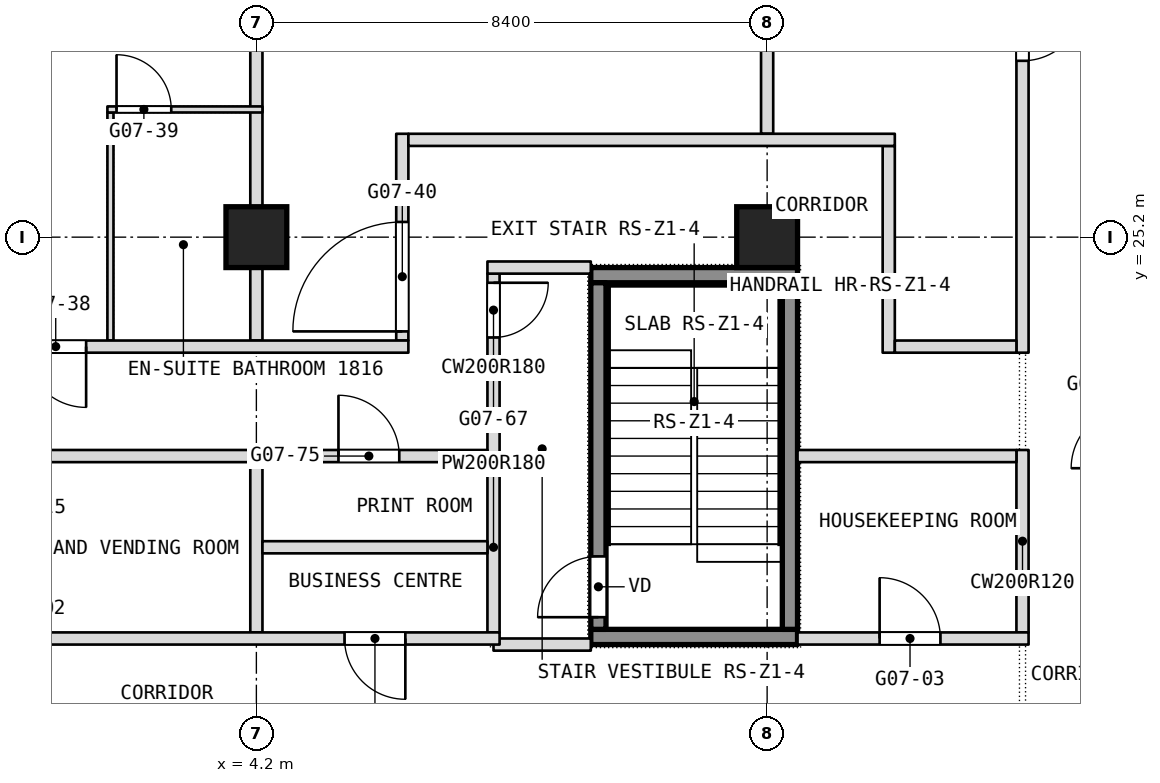
"""IFC4 building model, lengths in metres.
Left out: names, types, materials, properties, quantities, classifications, styles, units other than length and angle.
Written with IfcOpenShell. Run it as: python <this file> out.ifc"""

import sys

from ifc_helpers import new_model, si_unit, direction, frame, frame_2d, origin, origin_2d, place, context, subcontext, project, spatial, rectangle, extrude, element, fill, save


model = new_model("IFC4")
c1 = context("Model", 3, precision=1e-05, world=origin(), true_north=direction((0.0, 1.0)))
c2 = subcontext(c1, "Body", "Model", "MODEL_VIEW")
j1 = project(units=[si_unit("LENGTHUNIT", "METRE"), si_unit("PLANEANGLEUNIT", "RADIAN")], contexts=[c1])
p1 = place(None, origin())
s1 = spatial("IfcSite", under=j1, at=p1, CompositionType="ELEMENT")
p2 = place(p1, origin())
s2 = spatial("IfcBuilding", under=s1, at=p2, CompositionType="ELEMENT")
p3 = place(p2, frame((0.0, 0.0, 79.7)))
s3 = spatial("IfcBuildingStorey", under=s2, at=p3, CompositionType="ELEMENT", Elevation=79.7)
for number, where, z_axis, x_axis in (
    (1, (4.2, 25.2, 0.0), (0.0, 0.0, 1.0), (1.0, 0.0, 0.0)),
    (2, (12.6, 25.2, 0.0), (0.0, 0.0, 1.0), (1.0, 0.0, 0.0)),
):
    element("IfcColumn", number, at=place(p3, frame(where, z_axis=z_axis, x_axis=x_axis)), inside=s3, PredefinedType="COLUMN", context=c2, shape_type="SweptSolid", body=[
        extrude(rectangle(XDim=1.0, YDim=1.0, at=origin_2d()), origin(), (0.0, 0.0, 1.0), 3.6),
    ])
p4 = place(p3, frame((16.8, 18.7, 0.0), z_axis=(0.0, 0.0, 1.0), x_axis=(0.0, 1.0, 0.0)))
e3 = element("IfcWall", 3, at=p4, inside=s3, PredefinedType="PARTITIONING", context=c2, shape_type="SweptSolid", body=[
    extrude(rectangle(XDim=3.0, YDim=0.2, at=frame_2d((1.5, 0.0))), origin(), (0.0, 0.0, 1.0), 3.34),
])
p5 = place(p3, frame((16.8, 23.3, 0.0), z_axis=(0.0, 0.0, 1.0), x_axis=(0.0, 1.0, 0.0)))
e4 = element("IfcWall", 4, at=p5, inside=s3, PredefinedType="PARTITIONING", context=c2, shape_type="SweptSolid", body=[
    extrude(rectangle(XDim=10.24, YDim=0.2, at=frame_2d((5.12, 0.0))), origin(), (0.0, 0.0, 1.0), 3.34),
])
p6 = place(p5, frame((4.8, 0.0, 0.0)))
e5 = element("IfcOpeningElement", 5, at=p6, cuts=e4, PredefinedType="OPENING", context=c2, shape_type="SweptSolid", body=[
    extrude(rectangle(XDim=1.0, YDim=2.1, at=frame_2d((0.5, 1.05))), frame((0.0, 0.1, 0.0), z_axis=(0.0, -1.0, 0.0), x_axis=(1.0, 0.0, 0.0)), (0.0, 0.0, 1.0), 0.2),
])
p7 = place(p3, frame((14.6, 23.3, 0.0), z_axis=(0.0, 0.0, 1.0), x_axis=(0.0, 1.0, 0.0)))
e6 = element("IfcWall", 6, at=p7, inside=s3, PredefinedType="PARTITIONING", context=c2, shape_type="SweptSolid", body=[
    extrude(rectangle(XDim=3.4, YDim=0.2, at=frame_2d((1.7, 0.0))), origin(), (0.0, 0.0, 1.0), 3.34),
])
p8 = place(p3, frame((12.6, 26.9, 0.0), z_axis=(0.0, 0.0, 1.0), x_axis=(0.0, 1.0, 0.0)))
e7 = element("IfcWall", 7, at=p8, inside=s3, PredefinedType="PARTITIONING", context=c2, shape_type="SweptSolid", body=[
    extrude(rectangle(XDim=6.64, YDim=0.2, at=frame_2d((3.32, 0.0))), origin(), (0.0, 0.0, 1.0), 3.34),
])
p9 = place(p3, frame((8.1, 18.7, 0.0), z_axis=(0.0, 0.0, 1.0), x_axis=(0.0, 1.0, 0.0)))
e8 = element("IfcWall", 8, at=p9, inside=s3, PredefinedType="PARTITIONING", context=c2, shape_type="SweptSolid", body=[
    extrude(rectangle(XDim=2.8, YDim=0.2, at=frame_2d((1.4, 0.0))), origin(), (0.0, 0.0, 1.0), 3.34),
])
p10 = place(p3, frame((8.1, 21.5, 0.0), z_axis=(0.0, 0.0, 1.0), x_axis=(0.0, 1.0, 0.0)))
e9 = element("IfcWall", 9, at=p10, inside=s3, PredefinedType="PARTITIONING", context=c2, shape_type="SweptSolid", body=[
    extrude(rectangle(XDim=3.1, YDim=0.2, at=frame_2d((1.55, 0.0))), origin(), (0.0, 0.0, 1.0), 3.34),
])
p11 = place(p10, frame((2.05, 0.0, 0.0)))
e10 = element("IfcOpeningElement", 10, at=p11, cuts=e9, PredefinedType="OPENING", context=c2, shape_type="SweptSolid", body=[
    extrude(rectangle(XDim=0.9, YDim=2.1, at=frame_2d((0.45, 1.05))), frame((0.0, 0.1, 0.0), z_axis=(0.0, -1.0, 0.0), x_axis=(1.0, 0.0, 0.0)), (0.0, 0.0, 1.0), 0.2),
])
p12 = place(p3, frame((6.6, 23.5, 0.0), z_axis=(0.0, 0.0, 1.0), x_axis=(0.0, 1.0, 0.0)))
e11 = element("IfcWall", 11, at=p12, inside=s3, PredefinedType="PARTITIONING", context=c2, shape_type="SweptSolid", body=[
    extrude(rectangle(XDim=3.4, YDim=0.2, at=frame_2d((1.7, 0.0))), origin(), (0.0, 0.0, 1.0), 3.34),
])
p13 = place(p12, frame((0.15, 0.0, 0.0)))
e12 = element("IfcOpeningElement", 12, at=p13, cuts=e11, PredefinedType="OPENING", context=c2, shape_type="SweptSolid", body=[
    extrude(rectangle(XDim=1.8, YDim=2.1, at=frame_2d((0.9, 1.05))), frame((0.0, 0.1, 0.0), z_axis=(0.0, -1.0, 0.0), x_axis=(1.0, 0.0, 0.0)), (0.0, 0.0, 1.0), 0.2),
])
p14 = place(p3, frame((4.2, 18.7, 0.0), z_axis=(0.0, 0.0, 1.0), x_axis=(0.0, 1.0, 0.0)))
e13 = element("IfcWall", 13, at=p14, inside=s3, PredefinedType="PARTITIONING", context=c2, shape_type="SweptSolid", body=[
    extrude(rectangle(XDim=2.8, YDim=0.2, at=frame_2d((1.4, 0.0))), origin(), (0.0, 0.0, 1.0), 3.34),
])
p15 = place(p3, frame((4.2, 23.5, 0.0), z_axis=(0.0, 0.0, 1.0), x_axis=(0.0, 1.0, 0.0)))
e14 = element("IfcWall", 14, at=p15, inside=s3, PredefinedType="PARTITIONING", context=c2, shape_type="SweptSolid", body=[
    extrude(rectangle(XDim=10.04, YDim=0.2, at=frame_2d((5.02, 0.0))), origin(), (0.0, 0.0, 1.0), 3.34),
])
p16 = place(p3, frame((1.8, 23.5, 0.0), z_axis=(0.0, 0.0, 1.0), x_axis=(0.0, 1.0, 0.0)))
e15 = element("IfcWall", 15, at=p16, inside=s3, PredefinedType="PARTITIONING", context=c2, shape_type="SweptSolid", body=[
    extrude(rectangle(XDim=3.75, YDim=0.1, at=frame_2d((1.875, 0.0))), origin(), (0.0, 0.0, 1.0), 3.34),
])
p17 = place(p3, frame((8.1, 18.5, 0.0), z_axis=(0.0, 0.0, 1.0), x_axis=(1.0, 0.0, 0.0)))
e16 = element("IfcWall", 16, at=p17, inside=s3, PredefinedType="PARTITIONING", context=c2, shape_type="SweptSolid", body=[
    extrude(rectangle(XDim=1.6, YDim=0.2, at=frame_2d((0.8, 0.0))), origin(), (0.0, 0.0, 1.0), 3.34),
])
p18 = place(p3, frame((-16.9, 18.6, 0.0), z_axis=(0.0, 0.0, 1.0), x_axis=(1.0, 0.0, 0.0)))
e17 = element("IfcWall", 17, at=p18, inside=s3, PredefinedType="PARTITIONING", context=c2, shape_type="SweptSolid", body=[
    extrude(rectangle(XDim=25.1, YDim=0.2, at=frame_2d((12.55, 0.0))), origin(), (0.0, 0.0, 1.0), 3.34),
])
p19 = place(p18, frame((1.7, 0.0, 0.0)))
e18 = element("IfcOpeningElement", 18, at=p19, cuts=e17, PredefinedType="OPENING", context=c2, shape_type="SweptSolid", body=[
    extrude(rectangle(XDim=1.0, YDim=2.1, at=frame_2d((0.5, 1.05))), frame((0.0, 0.1, 0.0), z_axis=(0.0, -1.0, 0.0), x_axis=(1.0, 0.0, 0.0)), (0.0, 0.0, 1.0), 0.2),
])
p20 = place(p18, frame((16.4, 0.0, 0.0)))
e19 = element("IfcOpeningElement", 19, at=p20, cuts=e17, PredefinedType="OPENING", context=c2, shape_type="SweptSolid", body=[
    extrude(rectangle(XDim=1.0, YDim=2.1, at=frame_2d((0.5, 1.05))), frame((0.0, 0.1, 0.0), z_axis=(0.0, -1.0, 0.0), x_axis=(1.0, 0.0, 0.0)), (0.0, 0.0, 1.0), 0.2),
])
p21 = place(p18, frame((8.0, 0.0, 0.0)))
e20 = element("IfcOpeningElement", 20, at=p21, cuts=e17, PredefinedType="OPENING", context=c2, shape_type="SweptSolid", body=[
    extrude(rectangle(XDim=1.0, YDim=2.1, at=frame_2d((0.5, 1.05))), frame((0.0, 0.1, 0.0), z_axis=(0.0, -1.0, 0.0), x_axis=(1.0, 0.0, 0.0)), (0.0, 0.0, 1.0), 0.2),
])
p22 = place(p18, frame((22.55, 0.0, 0.0)))
e21 = element("IfcOpeningElement", 21, at=p22, cuts=e17, PredefinedType="OPENING", context=c2, shape_type="SweptSolid", body=[
    extrude(rectangle(XDim=1.0, YDim=2.1, at=frame_2d((0.5, 1.05))), frame((0.0, 0.1, 0.0), z_axis=(0.0, -1.0, 0.0), x_axis=(1.0, 0.0, 0.0)), (0.0, 0.0, 1.0), 0.2),
])
p23 = place(p3, frame((13.1, 18.6, 0.0), z_axis=(0.0, 0.0, 1.0), x_axis=(1.0, 0.0, 0.0)))
e22 = element("IfcWall", 22, at=p23, inside=s3, PredefinedType="PARTITIONING", context=c2, shape_type="SweptSolid", body=[
    extrude(rectangle(XDim=3.8, YDim=0.2, at=frame_2d((1.9, 0.0))), origin(), (0.0, 0.0, 1.0), 3.34),
])
p24 = place(p23, frame((1.35, 0.0, 0.0)))
e23 = element("IfcOpeningElement", 23, at=p24, cuts=e22, PredefinedType="OPENING", context=c2, shape_type="SweptSolid", body=[
    extrude(rectangle(XDim=1.0, YDim=2.1, at=frame_2d((0.5, 1.05))), frame((0.0, 0.1, 0.0), z_axis=(0.0, -1.0, 0.0), x_axis=(1.0, 0.0, 0.0)), (0.0, 0.0, 1.0), 0.2),
])
p25 = place(p3, frame((4.3, 20.1, 0.0), z_axis=(0.0, 0.0, 1.0), x_axis=(1.0, 0.0, 0.0)))
e24 = element("IfcWall", 24, at=p25, inside=s3, PredefinedType="PARTITIONING", context=c2, shape_type="SweptSolid", body=[
    extrude(rectangle(XDim=3.7, YDim=0.2, at=frame_2d((1.85, 0.0))), origin(), (0.0, 0.0, 1.0), 3.34),
])
p26 = place(p3, frame((-16.7, 21.6, 0.0), z_axis=(0.0, 0.0, 1.0), x_axis=(1.0, 0.0, 0.0)))
e25 = element("IfcWall", 25, at=p26, inside=s3, PredefinedType="PARTITIONING", context=c2, shape_type="SweptSolid", body=[
    extrude(rectangle(XDim=24.7, YDim=0.2, at=frame_2d((12.35, 0.0))), origin(), (0.0, 0.0, 1.0), 3.34),
])
p27 = place(p26, frame((7.8, 0.0, 0.0)))
e26 = element("IfcOpeningElement", 26, at=p27, cuts=e25, PredefinedType="OPENING", context=c2, shape_type="SweptSolid", body=[
    extrude(rectangle(XDim=1.0, YDim=2.1, at=frame_2d((0.5, 1.05))), frame((0.0, 0.1, 0.0), z_axis=(0.0, -1.0, 0.0), x_axis=(1.0, 0.0, 0.0)), (0.0, 0.0, 1.0), 0.2),
])
p28 = place(p26, frame((22.25, 0.0, 0.0)))
e27 = element("IfcOpeningElement", 27, at=p28, cuts=e25, PredefinedType="OPENING", context=c2, shape_type="SweptSolid", body=[
    extrude(rectangle(XDim=1.0, YDim=2.1, at=frame_2d((0.5, 1.05))), frame((0.0, 0.1, 0.0), z_axis=(0.0, -1.0, 0.0), x_axis=(1.0, 0.0, 0.0)), (0.0, 0.0, 1.0), 0.2),
])
p29 = place(p3, frame((13.1, 21.6, 0.0), z_axis=(0.0, 0.0, 1.0), x_axis=(1.0, 0.0, 0.0)))
e28 = element("IfcWall", 28, at=p29, inside=s3, PredefinedType="PARTITIONING", context=c2, shape_type="SweptSolid", body=[
    extrude(rectangle(XDim=3.6, YDim=0.2, at=frame_2d((1.8, 0.0))), origin(), (0.0, 0.0, 1.0), 3.34),
])
p30 = place(p3, frame((-16.7, 23.4, 0.0), z_axis=(0.0, 0.0, 1.0), x_axis=(1.0, 0.0, 0.0)))
e29 = element("IfcWall", 29, at=p30, inside=s3, PredefinedType="PARTITIONING", context=c2, shape_type="SweptSolid", body=[
    extrude(rectangle(XDim=23.4, YDim=0.2, at=frame_2d((11.7, 0.0))), origin(), (0.0, 0.0, 1.0), 3.34),
])
p31 = place(p30, frame((2.4, 0.0, 0.0)))
e30 = element("IfcOpeningElement", 30, at=p31, cuts=e29, PredefinedType="OPENING", context=c2, shape_type="SweptSolid", body=[
    extrude(rectangle(XDim=0.9, YDim=2.1, at=frame_2d((0.45, 1.05))), frame((0.0, 0.1, 0.0), z_axis=(0.0, -1.0, 0.0), x_axis=(1.0, 0.0, 0.0)), (0.0, 0.0, 1.0), 0.2),
])
p32 = place(p30, frame((5.65, 0.0, 0.0)))
e31 = element("IfcOpeningElement", 31, at=p32, cuts=e29, PredefinedType="OPENING", context=c2, shape_type="SweptSolid", body=[
    extrude(rectangle(XDim=1.1, YDim=2.1, at=frame_2d((0.55, 1.05))), frame((0.0, 0.1, 0.0), z_axis=(0.0, -1.0, 0.0), x_axis=(1.0, 0.0, 0.0)), (0.0, 0.0, 1.0), 0.2),
])
p33 = place(p30, frame((15.3, 0.0, 0.0)))
e32 = element("IfcOpeningElement", 32, at=p33, cuts=e29, PredefinedType="OPENING", context=c2, shape_type="SweptSolid", body=[
    extrude(rectangle(XDim=1.0, YDim=2.1, at=frame_2d((0.5, 1.05))), frame((0.0, 0.1, 0.0), z_axis=(0.0, -1.0, 0.0), x_axis=(1.0, 0.0, 0.0)), (0.0, 0.0, 1.0), 0.2),
])
p34 = place(p30, frame((17.1, 0.0, 0.0)))
e33 = element("IfcOpeningElement", 33, at=p34, cuts=e29, PredefinedType="OPENING", context=c2, shape_type="SweptSolid", body=[
    extrude(rectangle(XDim=1.0, YDim=2.1, at=frame_2d((0.5, 1.05))), frame((0.0, 0.1, 0.0), z_axis=(0.0, -1.0, 0.0), x_axis=(1.0, 0.0, 0.0)), (0.0, 0.0, 1.0), 0.2),
])
p35 = place(p3, frame((14.7, 23.4, 0.0), z_axis=(0.0, 0.0, 1.0), x_axis=(1.0, 0.0, 0.0)))
e34 = element("IfcWall", 34, at=p35, inside=s3, PredefinedType="PARTITIONING", context=c2, shape_type="SweptSolid", body=[
    extrude(rectangle(XDim=2.0, YDim=0.2, at=frame_2d((1.0, 0.0))), origin(), (0.0, 0.0, 1.0), 3.34),
])
p36 = place(p3, frame((8.0, 24.7, 0.0), z_axis=(0.0, 0.0, 1.0), x_axis=(1.0, 0.0, 0.0)))
e35 = element("IfcWall", 35, at=p36, inside=s3, PredefinedType="PARTITIONING", context=c2, shape_type="SweptSolid", body=[
    extrude(rectangle(XDim=1.7, YDim=0.2, at=frame_2d((0.85, 0.0))), origin(), (0.0, 0.0, 1.0), 3.34),
])
p37 = place(p3, frame((6.7, 26.8, 0.0), z_axis=(0.0, 0.0, 1.0), x_axis=(1.0, 0.0, 0.0)))
e36 = element("IfcWall", 36, at=p37, inside=s3, PredefinedType="PARTITIONING", context=c2, shape_type="SweptSolid", body=[
    extrude(rectangle(XDim=8.0, YDim=0.2, at=frame_2d((4.0, 0.0))), origin(), (0.0, 0.0, 1.0), 3.34),
])
p38 = place(p3, frame((1.75, 27.3, 0.0), z_axis=(0.0, 0.0, 1.0), x_axis=(1.0, 0.0, 0.0)))
e37 = element("IfcWall", 37, at=p38, inside=s3, PredefinedType="PARTITIONING", context=c2, shape_type="SweptSolid", body=[
    extrude(rectangle(XDim=2.55, YDim=0.1, at=frame_2d((1.275, 0.0))), origin(), (0.0, 0.0, 1.0), 3.34),
])
p39 = place(p38, frame((0.15, 0.0, 0.0)))
e38 = element("IfcOpeningElement", 38, at=p39, cuts=e37, PredefinedType="OPENING", context=c2, shape_type="SweptSolid", body=[
    extrude(rectangle(XDim=0.9, YDim=2.1, at=frame_2d((0.45, 1.05))), frame((0.0, 0.05, 0.0), z_axis=(0.0, -1.0, 0.0), x_axis=(1.0, 0.0, 0.0)), (0.0, 0.0, 1.0), 0.1),
])
for number, where, z_axis, x_axis in (
    (39, (9.7, 18.625, 0.1), (0.0, 0.0, 1.0), (1.0, 0.0, 0.0)),
    (40, (9.7, 24.575, 0.1), (0.0, 0.0, 1.0), (1.0, 0.0, 0.0)),
):
    element("IfcWall", number, at=place(p3, frame(where, z_axis=z_axis, x_axis=x_axis)), inside=s3, PredefinedType="SHEAR", context=c2, shape_type="SweptSolid", body=[
        extrude(rectangle(XDim=3.4, YDim=0.25, at=frame_2d((1.7, 0.0))), origin(), (0.0, 0.0, 1.0), 3.6),
    ])
p40 = place(p3, frame((9.825, 18.75, 0.1), z_axis=(0.0, 0.0, 1.0), x_axis=(0.0, 1.0, 0.0)))
e41 = element("IfcWall", 41, at=p40, inside=s3, PredefinedType="SHEAR", context=c2, shape_type="SweptSolid", body=[
    extrude(rectangle(XDim=5.7, YDim=0.25, at=frame_2d((2.85, 0.0))), origin(), (0.0, 0.0, 1.0), 3.6),
])
p41 = place(p40, frame((0.2, 0.0, 0.0)))
e42 = element("IfcOpeningElement", 42, at=p41, cuts=e41, PredefinedType="OPENING", context=c2, shape_type="SweptSolid", body=[
    extrude(rectangle(XDim=1.0, YDim=2.1, at=frame_2d((0.5, 1.05))), frame((0.0, 0.125, 0.0), z_axis=(0.0, -1.0, 0.0), x_axis=(1.0, 0.0, 0.0)), (0.0, 0.0, 1.0), 0.25),
])
p42 = place(p3, frame((12.975, 18.75, 0.1), z_axis=(0.0, 0.0, 1.0), x_axis=(0.0, 1.0, 0.0)))
e43 = element("IfcWall", 43, at=p42, inside=s3, PredefinedType="SHEAR", context=c2, shape_type="SweptSolid", body=[
    extrude(rectangle(XDim=5.7, YDim=0.25, at=frame_2d((2.85, 0.0))), origin(), (0.0, 0.0, 1.0), 3.6),
])
p43 = place(p6, origin())
e44 = element("IfcDoor", 44, at=p43, inside=s3, OperationType="SINGLE_SWING_LEFT", PredefinedType="DOOR", context=c2, shape_type="SweptSolid", body=[
    extrude(rectangle(XDim=1.0, YDim=2.1, at=frame_2d((0.5, 1.05))), frame((0.0, 0.025, 0.0), z_axis=(0.0, -1.0, 0.0), x_axis=(1.0, 0.0, 0.0)), (0.0, 0.0, 1.0), 0.05),
])
fill(e5, e44)
p44 = place(p11, origin())
e45 = element("IfcDoor", 45, at=p44, inside=s3, OperationType="SINGLE_SWING_LEFT", PredefinedType="DOOR", context=c2, shape_type="SweptSolid", body=[
    extrude(rectangle(XDim=0.9, YDim=2.1, at=frame_2d((0.45, 1.05))), frame((0.0, 0.025, 0.0), z_axis=(0.0, -1.0, 0.0), x_axis=(1.0, 0.0, 0.0)), (0.0, 0.0, 1.0), 0.05),
])
fill(e10, e45)
p45 = place(p13, origin())
e46 = element("IfcDoor", 46, at=p45, inside=s3, OperationType="DOUBLE_DOOR_SINGLE_SWING", PredefinedType="DOOR", context=c2, shape_type="SweptSolid", body=[
    extrude(rectangle(XDim=1.8, YDim=2.1, at=frame_2d((0.9, 1.05))), frame((0.0, 0.025, 0.0), z_axis=(0.0, -1.0, 0.0), x_axis=(1.0, 0.0, 0.0)), (0.0, 0.0, 1.0), 0.05),
])
fill(e12, e46)
p46 = place(p22, origin())
e47 = element("IfcDoor", 47, at=p46, inside=s3, OperationType="SINGLE_SWING_RIGHT", PredefinedType="DOOR", context=c2, shape_type="SweptSolid", body=[
    extrude(rectangle(XDim=1.0, YDim=2.1, at=frame_2d((0.5, 1.05))), frame((0.0, 0.025, 0.0), z_axis=(0.0, -1.0, 0.0), x_axis=(1.0, 0.0, 0.0)), (0.0, 0.0, 1.0), 0.05),
])
fill(e21, e47)
p47 = place(p24, origin())
e48 = element("IfcDoor", 48, at=p47, inside=s3, OperationType="SINGLE_SWING_RIGHT", PredefinedType="DOOR", context=c2, shape_type="SweptSolid", body=[
    extrude(rectangle(XDim=1.0, YDim=2.1, at=frame_2d((0.5, 1.05))), frame((0.0, 0.025, 0.0), z_axis=(0.0, -1.0, 0.0), x_axis=(1.0, 0.0, 0.0)), (0.0, 0.0, 1.0), 0.05),
])
fill(e23, e48)
p48 = place(p28, origin())
e49 = element("IfcDoor", 49, at=p48, inside=s3, OperationType="SINGLE_SWING_LEFT", PredefinedType="DOOR", context=c2, shape_type="SweptSolid", body=[
    extrude(rectangle(XDim=1.0, YDim=2.1, at=frame_2d((0.5, 1.05))), frame((0.0, 0.025, 0.0), z_axis=(0.0, -1.0, 0.0), x_axis=(1.0, 0.0, 0.0)), (0.0, 0.0, 1.0), 0.05),
])
fill(e27, e49)
p49 = place(p34, origin())
e50 = element("IfcDoor", 50, at=p49, inside=s3, OperationType="SINGLE_SWING_LEFT", PredefinedType="DOOR", context=c2, shape_type="SweptSolid", body=[
    extrude(rectangle(XDim=1.0, YDim=2.1, at=frame_2d((0.5, 1.05))), frame((0.0, 0.025, 0.0), z_axis=(0.0, -1.0, 0.0), x_axis=(1.0, 0.0, 0.0)), (0.0, 0.0, 1.0), 0.05),
])
fill(e33, e50)
p50 = place(p39, origin())
e51 = element("IfcDoor", 51, at=p50, inside=s3, OperationType="SINGLE_SWING_RIGHT", PredefinedType="DOOR", context=c2, shape_type="SweptSolid", body=[
    extrude(rectangle(XDim=0.9, YDim=2.1, at=frame_2d((0.45, 1.05))), frame((0.0, 0.025, 0.0), z_axis=(0.0, -1.0, 0.0), x_axis=(1.0, 0.0, 0.0)), (0.0, 0.0, 1.0), 0.05),
])
fill(e38, e51)
p51 = place(p41, origin())
e52 = element("IfcDoor", 52, at=p51, inside=s3, OperationType="SINGLE_SWING_LEFT", PredefinedType="DOOR", context=c2, shape_type="SweptSolid", body=[
    extrude(rectangle(XDim=1.0, YDim=2.1, at=frame_2d((0.5, 1.05))), frame((0.0, 0.025, 0.0), z_axis=(0.0, -1.0, 0.0), x_axis=(1.0, 0.0, 0.0)), (0.0, 0.0, 1.0), 0.05),
])
fill(e42, e52)
save(model, sys.argv[1])
